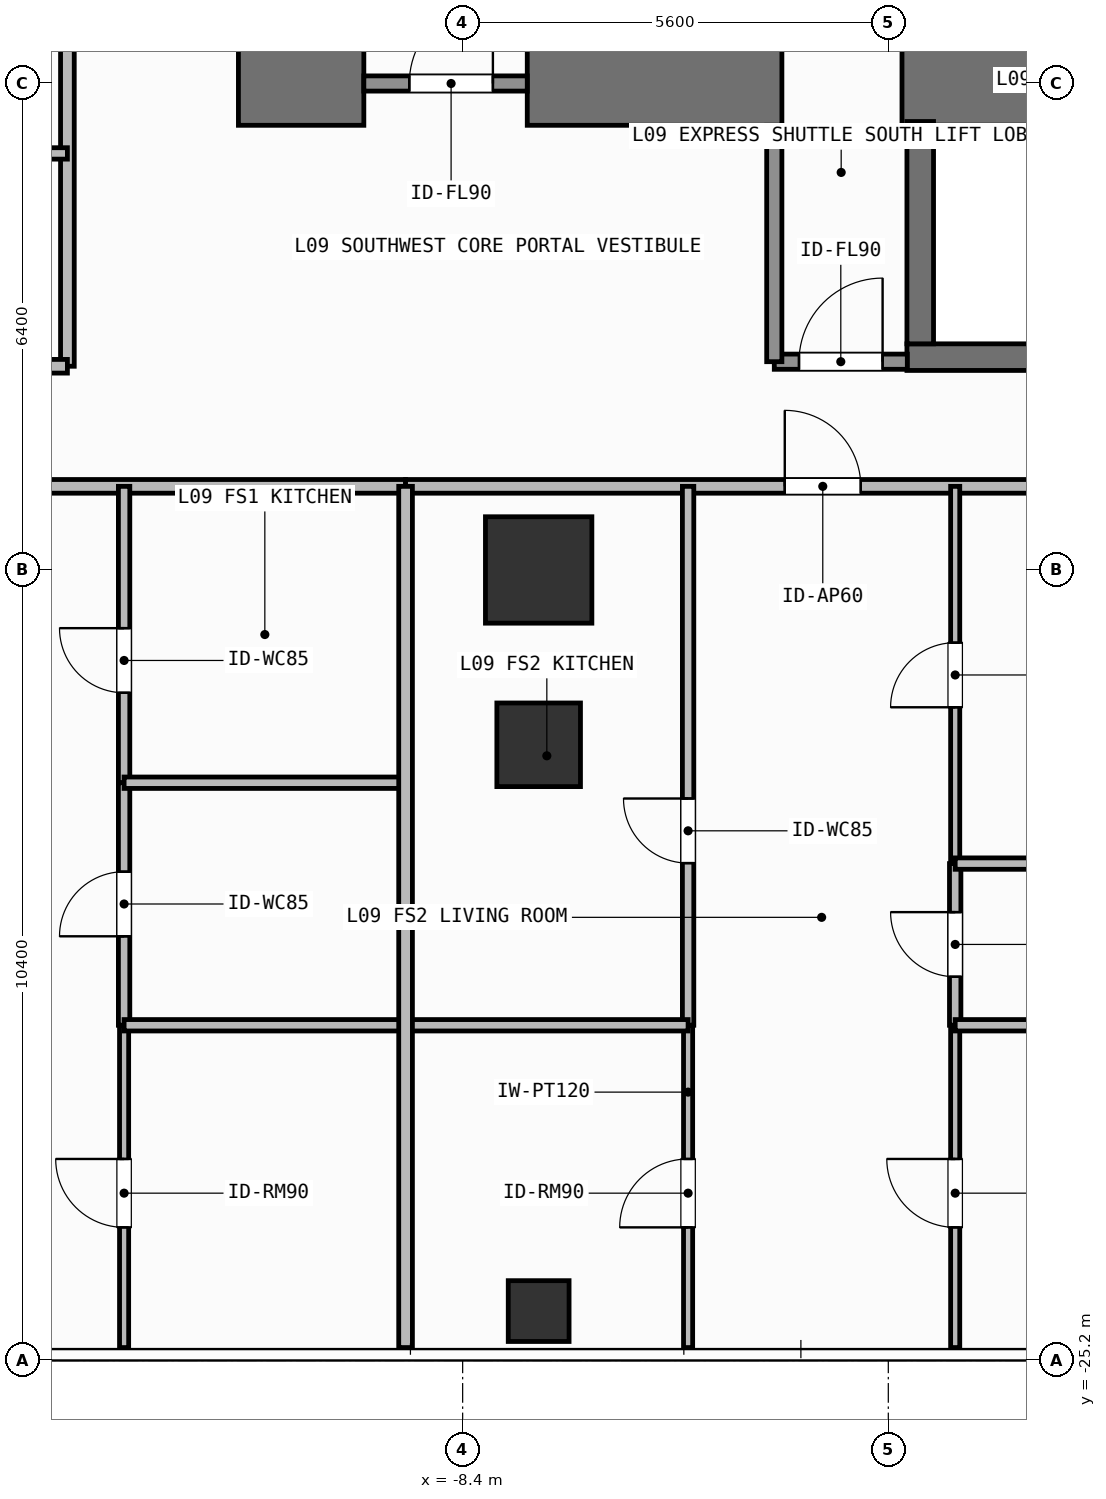
"""IFC4 building model, lengths in metres.
Left out: names, types, materials, properties, quantities, classifications, styles, units other than length and angle.
Written with IfcOpenShell. Run it as: python <this file> out.ifc"""

import sys

from ifc_helpers import new_model, si_unit, direction, frame, frame_2d, origin, origin_2d, place, context, subcontext, project, spatial, rectangle, hollow_rectangle, extrude, element, fill, save


model = new_model("IFC4")
c1 = context("Model", 3, precision=1e-05, world=origin(), true_north=direction((0.0, 1.0)))
c2 = subcontext(c1, "Body", "Model", "MODEL_VIEW")
j1 = project(units=[si_unit("LENGTHUNIT", "METRE"), si_unit("PLANEANGLEUNIT", "RADIAN")], contexts=[c1])
p1 = place(None, origin())
s1 = spatial("IfcSite", under=j1, at=p1, CompositionType="ELEMENT")
p2 = place(p1, origin())
s2 = spatial("IfcBuilding", under=s1, at=p2, CompositionType="ELEMENT")
p3 = place(p2, frame((0.0, 0.0, 34.5)))
s3 = spatial("IfcBuildingStorey", under=s2, at=p3, CompositionType="ELEMENT", Elevation=34.5)
p4 = place(p3, frame((-11.35, -8.4, 0.0), z_axis=(0.0, 0.0, 1.0), x_axis=(1.0, 0.0, 0.0)))
e1 = element("IfcWall", 1, at=p4, inside=s3, PredefinedType="SHEAR", context=c2, shape_type="SweptSolid", body=[
    extrude(rectangle(XDim=1.65, YDim=1.1, at=frame_2d((0.825, 0.0))), origin(), (0.0, 0.0, 1.0), 3.9),
])
p5 = place(p3, frame((-7.55, -8.4, 0.0), z_axis=(0.0, 0.0, 1.0), x_axis=(1.0, 0.0, 0.0)))
e2 = element("IfcWall", 2, at=p5, inside=s3, PredefinedType="SHEAR", context=c2, shape_type="SweptSolid", body=[
    extrude(rectangle(XDim=3.35, YDim=1.1, at=frame_2d((1.675, 0.0))), origin(), (0.0, 0.0, 1.0), 3.9),
])
p6 = place(p3, frame((-2.62, -8.4, 0.0), z_axis=(0.0, 0.0, 1.0), x_axis=(1.0, 0.0, 0.0)))
e3 = element("IfcWall", 3, at=p6, inside=s3, PredefinedType="SHEAR", context=c2, shape_type="SweptSolid", body=[
    extrude(rectangle(XDim=7.27, YDim=1.1, at=frame_2d((3.635, 0.0))), origin(), (0.0, 0.0, 1.0), 3.9),
])
p7 = place(p3, frame((-2.555, -12.0, 0.0), z_axis=(0.0, 0.0, 1.0), x_axis=(1.0, 0.0, 0.0)))
e4 = element("IfcWall", 4, at=p7, inside=s3, PredefinedType="SHEAR", context=c2, shape_type="SweptSolid", body=[
    extrude(rectangle(XDim=7.31, YDim=0.35, at=frame_2d((3.655, 0.0))), origin(), (0.0, 0.0, 1.0), 3.9),
])
p8 = place(p3, frame((-2.2, -8.988, 0.0), z_axis=(0.0, 0.0, 1.0), x_axis=(1.0, 0.0, 0.0)))
e5 = element("IfcWall", 5, at=p8, inside=s3, PredefinedType="SHEAR", context=c2, shape_type="SweptSolid", body=[
    extrude(rectangle(XDim=6.6, YDim=0.075, at=frame_2d((3.3, 0.0))), origin(), (0.0, 0.0, 1.0), 3.9),
])
p9 = place(p3, frame((-2.38, -11.825, 0.0), z_axis=(0.0, 0.0, 1.0), x_axis=(0.0, 1.0, 0.0)))
e6 = element("IfcWall", 6, at=p9, inside=s3, PredefinedType="SHEAR", context=c2, shape_type="SweptSolid", body=[
    extrude(rectangle(XDim=2.925, YDim=0.35, at=frame_2d((1.462, 0.0))), origin(), (0.0, 0.0, 1.0), 3.9),
])
p10 = place(p3, frame((-7.4, -14.8, 0.0), z_axis=(0.0, 0.0, 1.0), x_axis=(1.0, 0.0, 0.0)))
e7 = element("IfcColumn", 7, at=p10, inside=s3, PredefinedType="COLUMN", context=c2, shape_type="SweptSolid", body=[
    extrude(rectangle(XDim=1.4, YDim=1.4, at=origin_2d()), origin(), (0.0, 0.0, 1.0), 3.9),
])
p11 = place(p3, frame((-7.4, -17.1, 0.0), z_axis=(0.0, 0.0, 1.0), x_axis=(1.0, 0.0, 0.0)))
e8 = element("IfcColumn", 8, at=p11, inside=s3, PredefinedType="COLUMN", context=c2, shape_type="SweptSolid", body=[
    extrude(rectangle(XDim=1.1, YDim=1.1, at=origin_2d()), origin(), (0.0, 0.0, 1.0), 3.9),
])
p12 = place(p3, frame((-7.4, -24.55, 0.0), z_axis=(0.0, 0.0, 1.0), x_axis=(1.0, 0.0, 0.0)))
e9 = element("IfcColumn", 9, at=p12, inside=s3, PredefinedType="COLUMN", context=c2, shape_type="SweptSolid", body=[
    extrude(hollow_rectangle(XDim=0.8, YDim=0.8, WallThickness=0.036, at=origin_2d()), origin(), (0.0, 0.0, 1.0), 3.9),
])
p13 = place(p3, frame((-9.7, -8.4, 0.0), z_axis=(0.0, 0.0, 1.0), x_axis=(1.0, 0.0, 0.0)))
e10 = element("IfcWall", 10, at=p13, inside=s3, PredefinedType="SOLIDWALL", context=c2, shape_type="SweptSolid", body=[
    extrude(rectangle(XDim=2.15, YDim=0.2, at=frame_2d((1.075, 0.0))), origin(), (0.0, 0.0, 1.0), 2.72),
])
p14 = place(p13, frame((0.598, 0.0, 0.0)))
e11 = element("IfcOpeningElement", 11, at=p14, cuts=e10, PredefinedType="OPENING", context=c2, shape_type="SweptSolid", body=[
    extrude(rectangle(XDim=1.1, YDim=2.15, at=frame_2d((0.55, 1.075))), frame((0.0, 0.11, 0.0), z_axis=(0.0, -1.0, 0.0), x_axis=(1.0, 0.0, 0.0)), (0.0, 0.0, 1.0), 0.22),
])
p15 = place(p3, frame((-4.3, -12.06, 0.0), z_axis=(0.0, 0.0, 1.0), x_axis=(1.0, 0.0, 0.0)))
e12 = element("IfcWall", 12, at=p15, inside=s3, PredefinedType="SOLIDWALL", context=c2, shape_type="SweptSolid", body=[
    extrude(rectangle(XDim=1.75, YDim=0.2, at=frame_2d((0.875, 0.0))), origin(), (0.0, 0.0, 1.0), 3.68),
])
p16 = place(p15, frame((0.325, 0.0, 0.0)))
e13 = element("IfcOpeningElement", 13, at=p16, cuts=e12, PredefinedType="OPENING", context=c2, shape_type="SweptSolid", body=[
    extrude(rectangle(XDim=1.1, YDim=2.15, at=frame_2d((0.55, 1.075))), frame((0.0, 0.11, 0.0), z_axis=(0.0, -1.0, 0.0), x_axis=(1.0, 0.0, 0.0)), (0.0, 0.0, 1.0), 0.22),
])
p17 = place(p3, frame((-18.62, -13.7, 0.0), z_axis=(0.0, 0.0, 1.0), x_axis=(1.0, 0.0, 0.0)))
e14 = element("IfcWall", 14, at=p17, inside=s3, PredefinedType="PARTITIONING", context=c2, shape_type="SweptSolid", body=[
    extrude(rectangle(XDim=9.469, YDim=0.18, at=frame_2d((4.735, 0.0))), origin(), (0.0, 0.0, 1.0), 3.68),
])
p18 = place(p17, frame((1.931, 0.0, 0.0)))
e15 = element("IfcOpeningElement", 15, at=p18, cuts=e14, PredefinedType="OPENING", context=c2, shape_type="SweptSolid", body=[
    extrude(rectangle(XDim=1.0, YDim=2.2, at=frame_2d((0.5, 1.1))), frame((0.0, 0.1, 0.0), z_axis=(0.0, -1.0, 0.0), x_axis=(1.0, 0.0, 0.0)), (0.0, 0.0, 1.0), 0.2),
])
p19 = place(p3, frame((-12.854, -17.599, 0.0), z_axis=(0.0, 0.0, 1.0), x_axis=(0.0, 1.0, 0.0)))
e16 = element("IfcWall", 16, at=p19, inside=s3, PredefinedType="PARTITIONING", context=c2, shape_type="SweptSolid", body=[
    extrude(rectangle(XDim=3.899, YDim=0.15, at=frame_2d((1.95, 0.0))), origin(), (0.0, 0.0, 1.0), 3.68),
])
p20 = place(p19, frame((1.183, 0.0, 0.0)))
e17 = element("IfcOpeningElement", 17, at=p20, cuts=e16, PredefinedType="OPENING", context=c2, shape_type="SweptSolid", body=[
    extrude(rectangle(XDim=0.85, YDim=2.1, at=frame_2d((0.425, 1.05))), frame((0.0, 0.085, 0.0), z_axis=(0.0, -1.0, 0.0), x_axis=(1.0, 0.0, 0.0)), (0.0, 0.0, 1.0), 0.17),
])
p21 = place(p3, frame((-12.854, -20.79, 0.0), z_axis=(0.0, 0.0, 1.0), x_axis=(0.0, 1.0, 0.0)))
e18 = element("IfcWall", 18, at=p21, inside=s3, PredefinedType="PARTITIONING", context=c2, shape_type="SweptSolid", body=[
    extrude(rectangle(XDim=3.191, YDim=0.15, at=frame_2d((1.595, 0.0))), origin(), (0.0, 0.0, 1.0), 3.68),
])
p22 = place(p21, frame((1.17, 0.0, 0.0)))
e19 = element("IfcOpeningElement", 19, at=p22, cuts=e18, PredefinedType="OPENING", context=c2, shape_type="SweptSolid", body=[
    extrude(rectangle(XDim=0.85, YDim=2.1, at=frame_2d((0.425, 1.05))), frame((0.0, 0.085, 0.0), z_axis=(0.0, -1.0, 0.0), x_axis=(1.0, 0.0, 0.0)), (0.0, 0.0, 1.0), 0.17),
])
p23 = place(p3, frame((-12.854, -25.03, 0.0), z_axis=(0.0, 0.0, 1.0), x_axis=(0.0, 1.0, 0.0)))
e20 = element("IfcWall", 20, at=p23, inside=s3, PredefinedType="PARTITIONING", context=c2, shape_type="SweptSolid", body=[
    extrude(rectangle(XDim=4.24, YDim=0.12, at=frame_2d((2.12, 0.0))), origin(), (0.0, 0.0, 1.0), 3.68),
])
p24 = place(p23, frame((1.581, 0.0, 0.0)))
e21 = element("IfcOpeningElement", 21, at=p24, cuts=e20, PredefinedType="OPENING", context=c2, shape_type="SweptSolid", body=[
    extrude(rectangle(XDim=0.9, YDim=2.1, at=frame_2d((0.45, 1.05))), frame((0.0, 0.07, 0.0), z_axis=(0.0, -1.0, 0.0), x_axis=(1.0, 0.0, 0.0)), (0.0, 0.0, 1.0), 0.14),
])
p25 = place(p3, frame((-9.151, -13.7, 0.0), z_axis=(0.0, 0.0, 1.0), x_axis=(1.0, 0.0, 0.0)))
e22 = element("IfcWall", 22, at=p25, inside=s3, PredefinedType="PARTITIONING", context=c2, shape_type="SweptSolid", body=[
    extrude(rectangle(XDim=12.051, YDim=0.18, at=frame_2d((6.025, 0.0))), origin(), (0.0, 0.0, 1.0), 3.68),
])
p26 = place(p25, frame((4.989, 0.0, 0.0)))
e23 = element("IfcOpeningElement", 23, at=p26, cuts=e22, PredefinedType="OPENING", context=c2, shape_type="SweptSolid", body=[
    extrude(rectangle(XDim=1.0, YDim=2.2, at=frame_2d((0.5, 1.1))), frame((0.0, 0.1, 0.0), z_axis=(0.0, -1.0, 0.0), x_axis=(1.0, 0.0, 0.0)), (0.0, 0.0, 1.0), 0.2),
])
p27 = place(p3, frame((-5.434, -20.79, 0.0), z_axis=(0.0, 0.0, 1.0), x_axis=(0.0, 1.0, 0.0)))
e24 = element("IfcWall", 24, at=p27, inside=s3, PredefinedType="PARTITIONING", context=c2, shape_type="SweptSolid", body=[
    extrude(rectangle(XDim=7.09, YDim=0.15, at=frame_2d((3.545, 0.0))), origin(), (0.0, 0.0, 1.0), 3.68),
])
p28 = place(p27, frame((2.133, 0.0, 0.0)))
e25 = element("IfcOpeningElement", 25, at=p28, cuts=e24, PredefinedType="OPENING", context=c2, shape_type="SweptSolid", body=[
    extrude(rectangle(XDim=0.85, YDim=2.1, at=frame_2d((0.425, 1.05))), frame((0.0, 0.085, 0.0), z_axis=(0.0, -1.0, 0.0), x_axis=(1.0, 0.0, 0.0)), (0.0, 0.0, 1.0), 0.17),
])
p29 = place(p3, frame((-5.434, -25.03, 0.0), z_axis=(0.0, 0.0, 1.0), x_axis=(0.0, 1.0, 0.0)))
e26 = element("IfcWall", 26, at=p29, inside=s3, PredefinedType="PARTITIONING", context=c2, shape_type="SweptSolid", body=[
    extrude(rectangle(XDim=4.24, YDim=0.12, at=frame_2d((2.12, 0.0))), origin(), (0.0, 0.0, 1.0), 3.68),
])
p30 = place(p29, frame((1.581, 0.0, 0.0)))
e27 = element("IfcOpeningElement", 27, at=p30, cuts=e26, PredefinedType="OPENING", context=c2, shape_type="SweptSolid", body=[
    extrude(rectangle(XDim=0.9, YDim=2.1, at=frame_2d((0.45, 1.05))), frame((0.0, 0.07, 0.0), z_axis=(0.0, -1.0, 0.0), x_axis=(1.0, 0.0, 0.0)), (0.0, 0.0, 1.0), 0.14),
])
p31 = place(p3, frame((-1.92, -20.79, 0.0), z_axis=(0.0, 0.0, 1.0), x_axis=(0.0, 1.0, 0.0)))
e28 = element("IfcWall", 28, at=p31, inside=s3, PredefinedType="PARTITIONING", context=c2, shape_type="SweptSolid", body=[
    extrude(rectangle(XDim=2.127, YDim=0.15, at=frame_2d((1.063, 0.0))), origin(), (0.0, 0.0, 1.0), 3.68),
])
p32 = place(p31, frame((0.638, 0.0, 0.0)))
e29 = element("IfcOpeningElement", 29, at=p32, cuts=e28, PredefinedType="OPENING", context=c2, shape_type="SweptSolid", body=[
    extrude(rectangle(XDim=0.85, YDim=2.1, at=frame_2d((0.425, 1.05))), frame((0.0, 0.085, 0.0), z_axis=(0.0, -1.0, 0.0), x_axis=(1.0, 0.0, 0.0)), (0.0, 0.0, 1.0), 0.17),
])
p33 = place(p3, frame((-1.92, -18.663, 0.0), z_axis=(0.0, 0.0, 1.0), x_axis=(0.0, 1.0, 0.0)))
e30 = element("IfcWall", 30, at=p33, inside=s3, PredefinedType="PARTITIONING", context=c2, shape_type="SweptSolid", body=[
    extrude(rectangle(XDim=4.963, YDim=0.12, at=frame_2d((2.481, 0.0))), origin(), (0.0, 0.0, 1.0), 3.68),
])
p34 = place(p33, frame((2.056, 0.0, 0.0)))
e31 = element("IfcOpeningElement", 31, at=p34, cuts=e30, PredefinedType="OPENING", context=c2, shape_type="SweptSolid", body=[
    extrude(rectangle(XDim=0.85, YDim=2.1, at=frame_2d((0.425, 1.05))), frame((0.0, 0.07, 0.0), z_axis=(0.0, -1.0, 0.0), x_axis=(1.0, 0.0, 0.0)), (0.0, 0.0, 1.0), 0.14),
])
p35 = place(p3, frame((-1.92, -25.03, 0.0), z_axis=(0.0, 0.0, 1.0), x_axis=(0.0, 1.0, 0.0)))
e32 = element("IfcWall", 32, at=p35, inside=s3, PredefinedType="PARTITIONING", context=c2, shape_type="SweptSolid", body=[
    extrude(rectangle(XDim=4.24, YDim=0.12, at=frame_2d((2.12, 0.0))), origin(), (0.0, 0.0, 1.0), 3.68),
])
p36 = place(p35, frame((1.581, 0.0, 0.0)))
e33 = element("IfcOpeningElement", 33, at=p36, cuts=e32, PredefinedType="OPENING", context=c2, shape_type="SweptSolid", body=[
    extrude(rectangle(XDim=0.9, YDim=2.1, at=frame_2d((0.45, 1.05))), frame((0.0, 0.07, 0.0), z_axis=(0.0, -1.0, 0.0), x_axis=(1.0, 0.0, 0.0)), (0.0, 0.0, 1.0), 0.14),
])
p37 = place(p3, frame((-13.6, -12.12, 0.0), z_axis=(0.0, 0.0, 1.0), x_axis=(0.0, 1.0, 0.0)))
e34 = element("IfcWall", 34, at=p37, inside=s3, PredefinedType="PARTITIONING", context=c2, shape_type="SweptSolid", body=[
    extrude(rectangle(XDim=12.847, YDim=0.18, at=frame_2d((6.424, 0.0))), origin(), (0.0, 0.0, 1.0), 3.68),
])
p38 = place(p37, frame((5.48, 0.0, 0.0)))
e35 = element("IfcOpeningElement", 35, at=p38, cuts=e34, PredefinedType="OPENING", context=c2, shape_type="SweptSolid", body=[
    extrude(rectangle(XDim=1.0, YDim=2.2, at=frame_2d((0.5, 1.1))), frame((0.0, 0.1, 0.0), z_axis=(0.0, -1.0, 0.0), x_axis=(1.0, 0.0, 0.0)), (0.0, 0.0, 1.0), 0.2),
])
p39 = place(p3, frame((-16.808, -9.32, 0.0), z_axis=(0.0, 0.0, 1.0), x_axis=(1.0, 0.0, 0.0)))
e36 = element("IfcWall", 36, at=p39, inside=s3, PredefinedType="PARTITIONING", context=c2, shape_type="SweptSolid", body=[
    extrude(rectangle(XDim=3.208, YDim=0.15, at=frame_2d((1.604, 0.0))), origin(), (0.0, 0.0, 1.0), 3.68),
])
p40 = place(p39, frame((0.33, 0.0, 0.0)))
e37 = element("IfcOpeningElement", 37, at=p40, cuts=e36, PredefinedType="OPENING", context=c2, shape_type="SweptSolid", body=[
    extrude(rectangle(XDim=0.85, YDim=2.1, at=frame_2d((0.425, 1.05))), frame((0.0, 0.085, 0.0), z_axis=(0.0, -1.0, 0.0), x_axis=(1.0, 0.0, 0.0)), (0.0, 0.0, 1.0), 0.17),
])
p41 = place(p3, frame((-4.3, -12.06, 0.0), z_axis=(0.0, 0.0, 1.0), x_axis=(0.0, 1.0, 0.0)))
e38 = element("IfcWall", 38, at=p41, inside=s3, PredefinedType="SOLIDWALL", context=c2, shape_type="SweptSolid", body=[
    extrude(rectangle(XDim=3.11, YDim=0.2, at=frame_2d((1.555, 0.0))), origin(), (0.0, 0.0, 1.0), 3.68),
])
for number, where, z_axis, x_axis in (
    (39, (-12.854, -17.599, 0.0), (0.0, 0.0, 1.0), (1.0, 0.0, 0.0)),
    (40, (-12.854, -20.79, 0.0), (0.0, 0.0, 1.0), (1.0, 0.0, 0.0)),
):
    element("IfcWall", number, at=place(p3, frame(where, z_axis=z_axis, x_axis=x_axis)), inside=s3, PredefinedType="PARTITIONING", context=c2, shape_type="SweptSolid", body=[
        extrude(rectangle(XDim=3.703, YDim=0.15, at=frame_2d((1.852, 0.0))), origin(), (0.0, 0.0, 1.0), 3.68),
    ])
p42 = place(p3, frame((-9.151, -20.79, 0.0), z_axis=(0.0, 0.0, 1.0), x_axis=(1.0, 0.0, 0.0)))
e41 = element("IfcWall", 41, at=p42, inside=s3, PredefinedType="PARTITIONING", context=c2, shape_type="SweptSolid", body=[
    extrude(rectangle(XDim=3.717, YDim=0.15, at=frame_2d((1.858, 0.0))), origin(), (0.0, 0.0, 1.0), 3.68),
])
for number, where, z_axis, x_axis in (
    (42, (-1.92, -18.663, 0.0), (0.0, 0.0, 1.0), (1.0, 0.0, 0.0)),
    (43, (-1.92, -20.79, 0.0), (0.0, 0.0, 1.0), (1.0, 0.0, 0.0)),
):
    element("IfcWall", number, at=place(p3, frame(where, z_axis=z_axis, x_axis=x_axis)), inside=s3, PredefinedType="PARTITIONING", context=c2, shape_type="SweptSolid", body=[
        extrude(rectangle(XDim=4.82, YDim=0.15, at=frame_2d((2.41, 0.0))), origin(), (0.0, 0.0, 1.0), 3.68),
    ])
p43 = place(p3, frame((-9.151, -25.03, 0.0), z_axis=(0.0, 0.0, 1.0), x_axis=(0.0, 1.0, 0.0)))
e44 = element("IfcWall", 44, at=p43, inside=s3, PredefinedType="PARTITIONING", context=c2, shape_type="SweptSolid", body=[
    extrude(rectangle(XDim=11.33, YDim=0.18, at=frame_2d((5.665, 0.0))), origin(), (0.0, 0.0, 1.0), 3.68),
])
p44 = place(p3, frame((-22.13, -12.12, 0.0), z_axis=(0.0, 0.0, 1.0), x_axis=(1.0, 0.0, 0.0)))
e45 = element("IfcWall", 45, at=p44, inside=s3, PredefinedType="PARTITIONING", context=c2, shape_type="SweptSolid", body=[
    extrude(rectangle(XDim=8.53, YDim=0.18, at=frame_2d((4.265, 0.0))), origin(), (0.0, 0.0, 1.0), 3.68),
])
p45 = place(p14, origin())
e46 = element("IfcDoor", 46, at=p45, inside=s3, OperationType="SINGLE_SWING_RIGHT", PredefinedType="DOOR", context=c2, shape_type="SweptSolid", body=[
    extrude(rectangle(XDim=1.1, YDim=2.15, at=frame_2d((0.55, 1.075))), frame((0.0, 0.025, 0.0), z_axis=(0.0, -1.0, 0.0), x_axis=(1.0, 0.0, 0.0)), (0.0, 0.0, 1.0), 0.05),
])
fill(e11, e46)
p46 = place(p16, origin())
e47 = element("IfcDoor", 47, at=p46, inside=s3, OperationType="SINGLE_SWING_RIGHT", PredefinedType="DOOR", context=c2, shape_type="SweptSolid", body=[
    extrude(rectangle(XDim=1.1, YDim=2.15, at=frame_2d((0.55, 1.075))), frame((0.0, 0.025, 0.0), z_axis=(0.0, -1.0, 0.0), x_axis=(1.0, 0.0, 0.0)), (0.0, 0.0, 1.0), 0.05),
])
fill(e13, e47)
p47 = place(p20, origin())
e48 = element("IfcDoor", 48, at=p47, inside=s3, OperationType="SINGLE_SWING_RIGHT", PredefinedType="DOOR", context=c2, shape_type="SweptSolid", body=[
    extrude(rectangle(XDim=0.85, YDim=2.1, at=frame_2d((0.425, 1.05))), frame((0.0, 0.025, 0.0), z_axis=(0.0, -1.0, 0.0), x_axis=(1.0, 0.0, 0.0)), (0.0, 0.0, 1.0), 0.05),
])
fill(e17, e48)
p48 = place(p22, origin())
e49 = element("IfcDoor", 49, at=p48, inside=s3, OperationType="SINGLE_SWING_LEFT", PredefinedType="DOOR", context=c2, shape_type="SweptSolid", body=[
    extrude(rectangle(XDim=0.85, YDim=2.1, at=frame_2d((0.425, 1.05))), frame((0.0, 0.025, 0.0), z_axis=(0.0, -1.0, 0.0), x_axis=(1.0, 0.0, 0.0)), (0.0, 0.0, 1.0), 0.05),
])
fill(e19, e49)
p49 = place(p24, origin())
e50 = element("IfcDoor", 50, at=p49, inside=s3, OperationType="SINGLE_SWING_RIGHT", PredefinedType="DOOR", context=c2, shape_type="SweptSolid", body=[
    extrude(rectangle(XDim=0.9, YDim=2.1, at=frame_2d((0.45, 1.05))), frame((0.0, 0.025, 0.0), z_axis=(0.0, -1.0, 0.0), x_axis=(1.0, 0.0, 0.0)), (0.0, 0.0, 1.0), 0.05),
])
fill(e21, e50)
p50 = place(p26, origin())
e51 = element("IfcDoor", 51, at=p50, inside=s3, OperationType="SINGLE_SWING_LEFT", PredefinedType="DOOR", context=c2, shape_type="SweptSolid", body=[
    extrude(rectangle(XDim=1.0, YDim=2.2, at=frame_2d((0.5, 1.1))), frame((0.0, 0.025, 0.0), z_axis=(0.0, -1.0, 0.0), x_axis=(1.0, 0.0, 0.0)), (0.0, 0.0, 1.0), 0.05),
])
fill(e23, e51)
p51 = place(p28, origin())
e52 = element("IfcDoor", 52, at=p51, inside=s3, OperationType="SINGLE_SWING_RIGHT", PredefinedType="DOOR", context=c2, shape_type="SweptSolid", body=[
    extrude(rectangle(XDim=0.85, YDim=2.1, at=frame_2d((0.425, 1.05))), frame((0.0, 0.025, 0.0), z_axis=(0.0, -1.0, 0.0), x_axis=(1.0, 0.0, 0.0)), (0.0, 0.0, 1.0), 0.05),
])
fill(e25, e52)
p52 = place(p30, origin())
e53 = element("IfcDoor", 53, at=p52, inside=s3, OperationType="SINGLE_SWING_LEFT", PredefinedType="DOOR", context=c2, shape_type="SweptSolid", body=[
    extrude(rectangle(XDim=0.9, YDim=2.1, at=frame_2d((0.45, 1.05))), frame((0.0, 0.025, 0.0), z_axis=(0.0, -1.0, 0.0), x_axis=(1.0, 0.0, 0.0)), (0.0, 0.0, 1.0), 0.05),
])
fill(e27, e53)
p53 = place(p32, origin())
e54 = element("IfcDoor", 54, at=p53, inside=s3, OperationType="SINGLE_SWING_RIGHT", PredefinedType="DOOR", context=c2, shape_type="SweptSolid", body=[
    extrude(rectangle(XDim=0.85, YDim=2.1, at=frame_2d((0.425, 1.05))), frame((0.0, 0.025, 0.0), z_axis=(0.0, -1.0, 0.0), x_axis=(1.0, 0.0, 0.0)), (0.0, 0.0, 1.0), 0.05),
])
fill(e29, e54)
p54 = place(p34, origin())
e55 = element("IfcDoor", 55, at=p54, inside=s3, OperationType="SINGLE_SWING_LEFT", PredefinedType="DOOR", context=c2, shape_type="SweptSolid", body=[
    extrude(rectangle(XDim=0.85, YDim=2.1, at=frame_2d((0.425, 1.05))), frame((0.0, 0.025, 0.0), z_axis=(0.0, -1.0, 0.0), x_axis=(1.0, 0.0, 0.0)), (0.0, 0.0, 1.0), 0.05),
])
fill(e31, e55)
p55 = place(p36, origin())
e56 = element("IfcDoor", 56, at=p55, inside=s3, OperationType="SINGLE_SWING_RIGHT", PredefinedType="DOOR", context=c2, shape_type="SweptSolid", body=[
    extrude(rectangle(XDim=0.9, YDim=2.1, at=frame_2d((0.45, 1.05))), frame((0.0, 0.025, 0.0), z_axis=(0.0, -1.0, 0.0), x_axis=(1.0, 0.0, 0.0)), (0.0, 0.0, 1.0), 0.05),
])
fill(e33, e56)
save(model, sys.argv[1])
